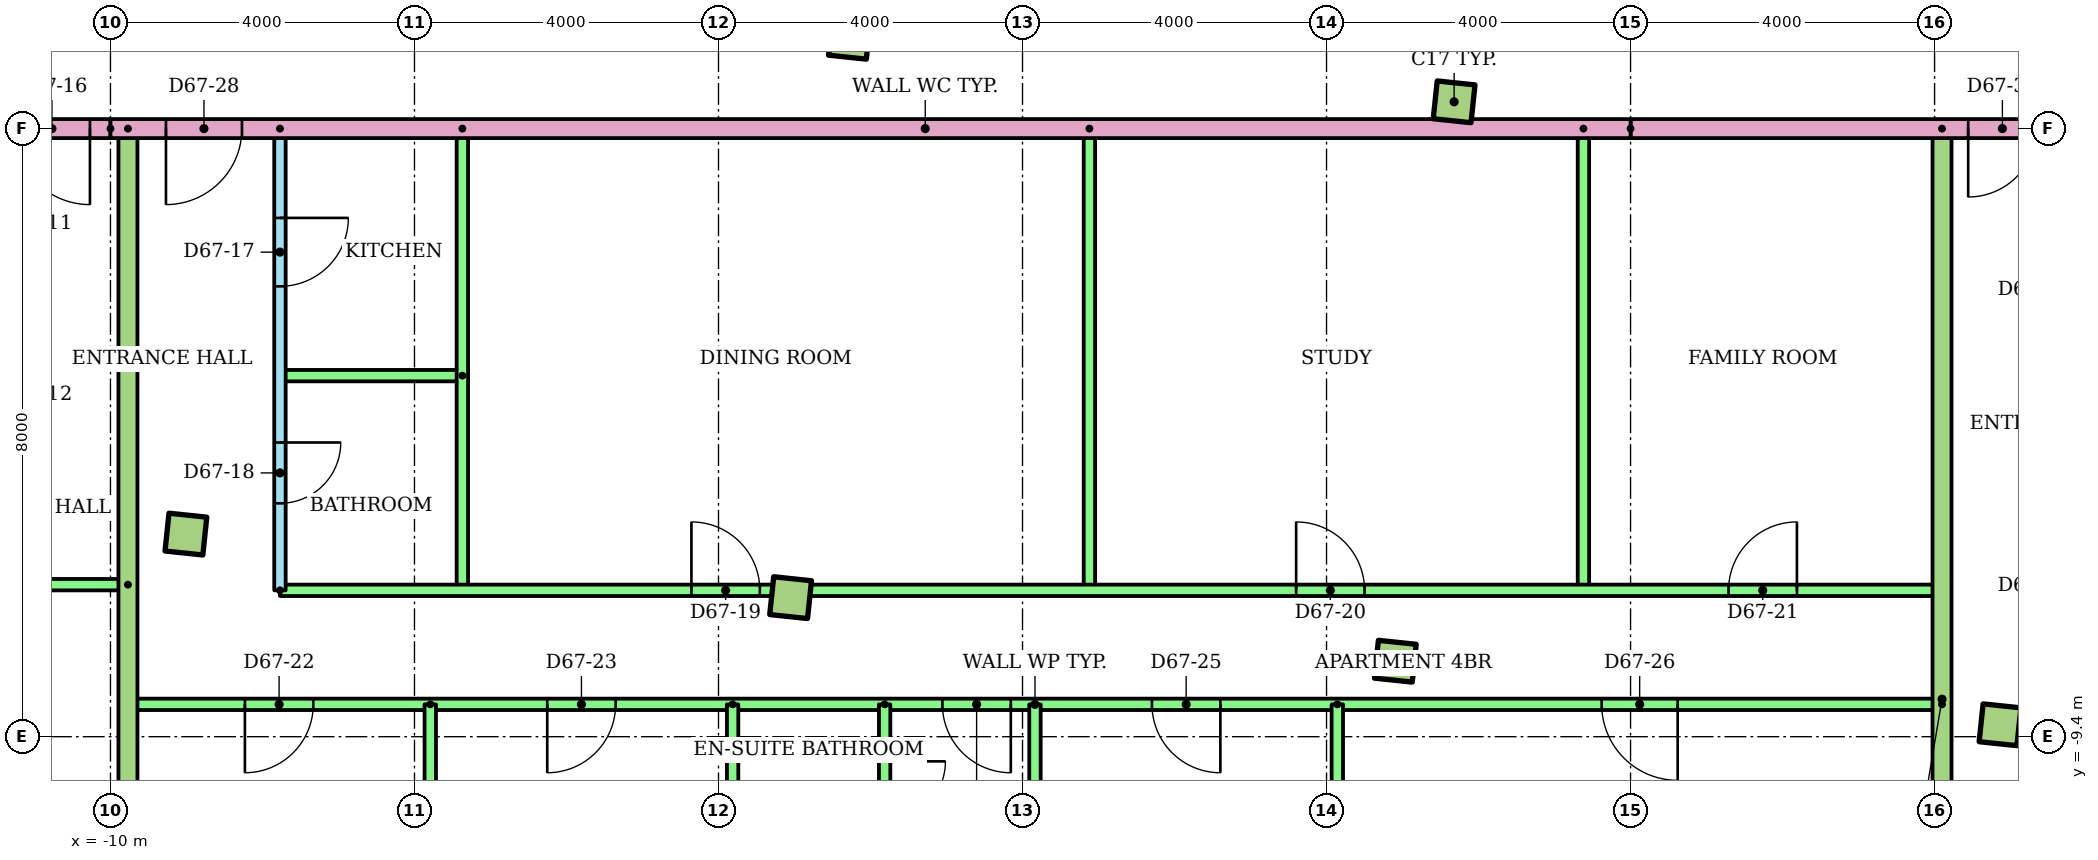
"""IFC4 building model, lengths in metres.
Left out: names, types, materials, properties, quantities, classifications, styles, units other than length and angle.
Written with IfcOpenShell. Run it as: python <this file> out.ifc"""

import sys

from ifc_helpers import new_model, si_unit, direction, frame, frame_2d, origin, origin_2d, place, context, subcontext, project, spatial, rectangle, extrude, element, fill, save


model = new_model("IFC4")
c1 = context("Model", 3, precision=1e-05, world=origin(), true_north=direction((0.0, 1.0)))
c2 = subcontext(c1, "Body", "Model", "MODEL_VIEW")
j1 = project(units=[si_unit("LENGTHUNIT", "METRE"), si_unit("PLANEANGLEUNIT", "RADIAN")], contexts=[c1])
p1 = place(None, origin())
s1 = spatial("IfcSite", under=j1, at=p1, CompositionType="ELEMENT")
p2 = place(p1, origin())
s2 = spatial("IfcBuilding", under=s1, at=p2, CompositionType="ELEMENT")
p3 = place(p2, frame((0.0, 0.0, 259.5)))
s3 = spatial("IfcBuildingStorey", under=s2, at=p3, CompositionType="ELEMENT", Elevation=259.5)
for number, where, z_axis, x_axis in (
    (1, (-9.007, -6.735, 0.0), (0.0, 0.0, 1.0), (0.995, -0.105, 0.0)),
    (2, (-1.051, -7.571, 0.0), (0.0, 0.0, 1.0), (0.995, -0.105, 0.0)),
    (3, (6.905, -8.407, 0.0), (0.0, 0.0, 1.0), (0.995, -0.105, 0.0)),
    (4, (14.861, -9.243, 0.0), (0.0, 0.0, 1.0), (0.995, -0.105, 0.0)),
    (5, (-0.278, -0.211, 0.0), (0.0, 0.0, 1.0), (0.995, -0.105, 0.0)),
    (6, (7.678, -1.048, 0.0), (0.0, 0.0, 1.0), (0.995, -0.105, 0.0)),
):
    element("IfcColumn", number, at=place(p3, frame(where, z_axis=z_axis, x_axis=x_axis)), inside=s3, PredefinedType="COLUMN", context=c2, shape_type="SweptSolid", body=[
        extrude(rectangle(XDim=0.5, YDim=0.5, at=origin_2d()), origin(), (0.0, 0.0, 1.0), 3.2),
    ])
p4 = place(p3, frame((-9.77, -7.4, 0.0), z_axis=(0.0, 0.0, 1.0), x_axis=(-1.0, 0.0, 0.0)))
e7 = element("IfcWall", 7, at=p4, inside=s3, PredefinedType="PARTITIONING", context=c2, shape_type="SweptSolid", body=[
    extrude(rectangle(XDim=14.411, YDim=0.15, at=frame_2d((7.206, 0.0))), origin(), (0.0, 0.0, 1.0), 2.4),
])
p5 = place(p4, frame((5.789, 0.0, 0.0)))
e8 = element("IfcOpeningElement", 8, at=p5, cuts=e7, PredefinedType="OPENING", context=c2, shape_type="SweptSolid", body=[
    extrude(rectangle(XDim=1.0, YDim=2.1, at=frame_2d((0.5, 1.05))), frame((0.0, 0.085, 0.0), z_axis=(0.0, -1.0, 0.0), x_axis=(1.0, 0.0, 0.0)), (0.0, 0.0, 1.0), 0.17),
])
p6 = place(p3, frame((-7.77, -1.4, 0.0), z_axis=(0.0, 0.0, 1.0), x_axis=(0.0, -1.0, 0.0)))
e9 = element("IfcWall", 9, at=p6, inside=s3, PredefinedType="PARTITIONING", context=c2, shape_type="SweptSolid", body=[
    extrude(rectangle(XDim=6.075, YDim=0.15, at=frame_2d((3.037, 0.0))), origin(), (0.0, 0.0, 1.0), 2.4),
])
p7 = place(p6, frame((1.175, 0.0, 0.0)))
e10 = element("IfcOpeningElement", 10, at=p7, cuts=e9, PredefinedType="OPENING", context=c2, shape_type="SweptSolid", body=[
    extrude(rectangle(XDim=0.9, YDim=2.1, at=frame_2d((0.45, 1.05))), frame((0.0, 0.085, 0.0), z_axis=(0.0, -1.0, 0.0), x_axis=(1.0, 0.0, 0.0)), (0.0, 0.0, 1.0), 0.17),
])
p8 = place(p6, frame((4.13, 0.0, 0.0)))
e11 = element("IfcOpeningElement", 11, at=p8, cuts=e9, PredefinedType="OPENING", context=c2, shape_type="SweptSolid", body=[
    extrude(rectangle(XDim=0.8, YDim=2.1, at=frame_2d((0.4, 1.05))), frame((0.0, 0.085, 0.0), z_axis=(0.0, -1.0, 0.0), x_axis=(1.0, 0.0, 0.0)), (0.0, 0.0, 1.0), 0.17),
])
p9 = place(p3, frame((-5.37, -4.65, 0.0), z_axis=(0.0, 0.0, 1.0), x_axis=(-1.0, 0.0, 0.0)))
e12 = element("IfcWall", 12, at=p9, inside=s3, PredefinedType="PARTITIONING", context=c2, shape_type="SweptSolid", body=[
    extrude(rectangle(XDim=2.4, YDim=0.15, at=frame_2d((1.2, 0.0))), origin(), (0.0, 0.0, 1.0), 2.4),
])
for number, where, z_axis, x_axis in (
    (13, (-5.37, -1.4, 0.0), (0.0, 0.0, 1.0), (0.0, -1.0, 0.0)),
    (14, (2.88, -1.4, 0.0), (0.0, 0.0, 1.0), (0.0, -1.0, 0.0)),
    (15, (9.38, -1.4, 0.0), (0.0, 0.0, 1.0), (0.0, -1.0, 0.0)),
):
    element("IfcWall", number, at=place(p3, frame(where, z_axis=z_axis, x_axis=x_axis)), inside=s3, PredefinedType="PARTITIONING", context=c2, shape_type="SweptSolid", body=[
        extrude(rectangle(XDim=6.075, YDim=0.15, at=frame_2d((3.037, 0.0))), origin(), (0.0, 0.0, 1.0), 2.4),
    ])
p10 = place(p3, frame((-7.77, -7.475, 0.0)))
e16 = element("IfcWall", 16, at=p10, inside=s3, PredefinedType="PARTITIONING", context=c2, shape_type="SweptSolid", body=[
    extrude(rectangle(XDim=21.868, YDim=0.15, at=frame_2d((10.934, 0.0))), origin(), (0.0, 0.0, 1.0), 2.4),
])
p11 = place(p10, frame((5.414, 0.0, 0.0)))
e17 = element("IfcOpeningElement", 17, at=p11, cuts=e16, PredefinedType="OPENING", context=c2, shape_type="SweptSolid", body=[
    extrude(rectangle(XDim=0.9, YDim=2.1, at=frame_2d((0.45, 1.05))), frame((0.0, 0.085, 0.0), z_axis=(0.0, -1.0, 0.0), x_axis=(1.0, 0.0, 0.0)), (0.0, 0.0, 1.0), 0.17),
])
p12 = place(p10, frame((13.37, 0.0, 0.0)))
e18 = element("IfcOpeningElement", 18, at=p12, cuts=e16, PredefinedType="OPENING", context=c2, shape_type="SweptSolid", body=[
    extrude(rectangle(XDim=0.9, YDim=2.1, at=frame_2d((0.45, 1.05))), frame((0.0, 0.085, 0.0), z_axis=(0.0, -1.0, 0.0), x_axis=(1.0, 0.0, 0.0)), (0.0, 0.0, 1.0), 0.17),
])
p13 = place(p10, frame((19.059, 0.0, 0.0)))
e19 = element("IfcOpeningElement", 19, at=p13, cuts=e16, PredefinedType="OPENING", context=c2, shape_type="SweptSolid", body=[
    extrude(rectangle(XDim=0.9, YDim=2.1, at=frame_2d((0.45, 1.05))), frame((0.0, 0.085, 0.0), z_axis=(0.0, -1.0, 0.0), x_axis=(1.0, 0.0, 0.0)), (0.0, 0.0, 1.0), 0.17),
])
p14 = place(p3, frame((14.098, -8.975, 0.0), z_axis=(0.0, 0.0, 1.0), x_axis=(-1.0, 0.0, 0.0)))
e20 = element("IfcWall", 20, at=p14, inside=s3, PredefinedType="PARTITIONING", context=c2, shape_type="SweptSolid", body=[
    extrude(rectangle(XDim=23.868, YDim=0.15, at=frame_2d((11.934, 0.0))), origin(), (0.0, 0.0, 1.0), 2.4),
])
p15 = place(p14, frame((21.429, 0.0, 0.0)))
e21 = element("IfcOpeningElement", 21, at=p15, cuts=e20, PredefinedType="OPENING", context=c2, shape_type="SweptSolid", body=[
    extrude(rectangle(XDim=0.9, YDim=2.1, at=frame_2d((0.45, 1.05))), frame((0.0, 0.085, 0.0), z_axis=(0.0, -1.0, 0.0), x_axis=(1.0, 0.0, 0.0)), (0.0, 0.0, 1.0), 0.17),
])
p16 = place(p14, frame((17.451, 0.0, 0.0)))
e22 = element("IfcOpeningElement", 22, at=p16, cuts=e20, PredefinedType="OPENING", context=c2, shape_type="SweptSolid", body=[
    extrude(rectangle(XDim=0.9, YDim=2.1, at=frame_2d((0.45, 1.05))), frame((0.0, 0.085, 0.0), z_axis=(0.0, -1.0, 0.0), x_axis=(1.0, 0.0, 0.0)), (0.0, 0.0, 1.0), 0.17),
])
p17 = place(p14, frame((12.252, 0.0, 0.0)))
e23 = element("IfcOpeningElement", 23, at=p17, cuts=e20, PredefinedType="OPENING", context=c2, shape_type="SweptSolid", body=[
    extrude(rectangle(XDim=0.9, YDim=2.1, at=frame_2d((0.45, 1.05))), frame((0.0, 0.085, 0.0), z_axis=(0.0, -1.0, 0.0), x_axis=(1.0, 0.0, 0.0)), (0.0, 0.0, 1.0), 0.17),
])
p18 = place(p14, frame((9.495, 0.0, 0.0)))
e24 = element("IfcOpeningElement", 24, at=p18, cuts=e20, PredefinedType="OPENING", context=c2, shape_type="SweptSolid", body=[
    extrude(rectangle(XDim=0.9, YDim=2.1, at=frame_2d((0.45, 1.05))), frame((0.0, 0.085, 0.0), z_axis=(0.0, -1.0, 0.0), x_axis=(1.0, 0.0, 0.0)), (0.0, 0.0, 1.0), 0.17),
])
p19 = place(p14, frame((3.478, 0.0, 0.0)))
e25 = element("IfcOpeningElement", 25, at=p19, cuts=e20, PredefinedType="OPENING", context=c2, shape_type="SweptSolid", body=[
    extrude(rectangle(XDim=1.0, YDim=2.1, at=frame_2d((0.5, 1.05))), frame((0.0, 0.085, 0.0), z_axis=(0.0, -1.0, 0.0), x_axis=(1.0, 0.0, 0.0)), (0.0, 0.0, 1.0), 0.17),
])
p20 = place(p3, frame((-5.792, -8.975, 0.0), z_axis=(0.0, 0.0, 1.0), x_axis=(0.0, -1.0, 0.0)))
e26 = element("IfcWall", 26, at=p20, inside=s3, PredefinedType="PARTITIONING", context=c2, shape_type="SweptSolid", body=[
    extrude(rectangle(XDim=5.359, YDim=0.15, at=frame_2d((2.679, 0.0))), origin(), (0.0, 0.0, 1.0), 2.4),
])
p21 = place(p3, frame((-1.814, -8.975, 0.0), z_axis=(0.0, 0.0, 1.0), x_axis=(0.0, -1.0, 0.0)))
e27 = element("IfcWall", 27, at=p21, inside=s3, PredefinedType="PARTITIONING", context=c2, shape_type="SweptSolid", body=[
    extrude(rectangle(XDim=5.766, YDim=0.15, at=frame_2d((2.883, 0.0))), origin(), (0.0, 0.0, 1.0), 2.4),
])
p22 = place(p3, frame((2.164, -8.975, 0.0), z_axis=(0.0, 0.0, 1.0), x_axis=(0.0, -1.0, 0.0)))
e28 = element("IfcWall", 28, at=p22, inside=s3, PredefinedType="PARTITIONING", context=c2, shape_type="SweptSolid", body=[
    extrude(rectangle(XDim=6.195, YDim=0.15, at=frame_2d((3.097, 0.0))), origin(), (0.0, 0.0, 1.0), 2.4),
])
p23 = place(p3, frame((6.142, -8.975, 0.0), z_axis=(0.0, 0.0, 1.0), x_axis=(0.0, -1.0, 0.0)))
e29 = element("IfcWall", 29, at=p23, inside=s3, PredefinedType="PARTITIONING", context=c2, shape_type="SweptSolid", body=[
    extrude(rectangle(XDim=6.602, YDim=0.15, at=frame_2d((3.301, 0.0))), origin(), (0.0, 0.0, 1.0), 2.4),
])
p24 = place(p3, frame((0.186, -8.975, 0.0), z_axis=(0.0, 0.0, 1.0), x_axis=(0.0, -1.0, 0.0)))
e30 = element("IfcWall", 30, at=p24, inside=s3, PredefinedType="PARTITIONING", context=c2, shape_type="SweptSolid", body=[
    extrude(rectangle(XDim=2.3, YDim=0.15, at=frame_2d((1.15, 0.0))), origin(), (0.0, 0.0, 1.0), 2.4),
])
p25 = place(p24, frame((0.75, 0.0, 0.0)))
e31 = element("IfcOpeningElement", 31, at=p25, cuts=e30, PredefinedType="OPENING", context=c2, shape_type="SweptSolid", body=[
    extrude(rectangle(XDim=0.8, YDim=2.1, at=frame_2d((0.4, 1.05))), frame((0.0, 0.085, 0.0), z_axis=(0.0, -1.0, 0.0), x_axis=(1.0, 0.0, 0.0)), (0.0, 0.0, 1.0), 0.17),
])
p26 = place(p3, frame((-9.77, -1.4, 0.0), z_axis=(0.0, 0.0, 1.0), x_axis=(0.0, -1.0, 0.0)))
e32 = element("IfcWall", 32, at=p26, inside=s3, PredefinedType="PARTITIONING", context=c2, shape_type="SweptSolid", body=[
    extrude(rectangle(XDim=12.504, YDim=0.25, at=frame_2d((6.252, 0.0))), origin(), (0.0, 0.0, 1.0), 2.4),
])
p27 = place(p3, frame((14.098, -1.4, 0.0), z_axis=(0.0, 0.0, 1.0), x_axis=(0.0, -1.0, 0.0)))
e33 = element("IfcWall", 33, at=p27, inside=s3, PredefinedType="PARTITIONING", context=c2, shape_type="SweptSolid", body=[
    extrude(rectangle(XDim=15.013, YDim=0.25, at=frame_2d((7.506, 0.0))), origin(), (0.0, 0.0, 1.0), 2.4),
])
p28 = place(p3, frame((-10.0, -1.4, 0.0), z_axis=(0.0, 0.0, 1.0), x_axis=(-1.0, 0.0, 0.0)))
e34 = element("IfcWall", 34, at=p28, inside=s3, PredefinedType="PARTITIONING", context=c2, shape_type="SweptSolid", body=[
    extrude(rectangle(XDim=13.56, YDim=0.25, at=frame_2d((6.78, 0.0))), origin(), (0.0, 0.0, 1.0), 2.4),
])
p29 = place(p28, frame((0.27, 0.0, 0.0)))
e35 = element("IfcOpeningElement", 35, at=p29, cuts=e34, PredefinedType="OPENING", context=c2, shape_type="SweptSolid", body=[
    extrude(rectangle(XDim=1.0, YDim=2.1, at=frame_2d((0.5, 1.05))), frame((0.0, 0.135, 0.0), z_axis=(0.0, -1.0, 0.0), x_axis=(1.0, 0.0, 0.0)), (0.0, 0.0, 1.0), 0.27),
])
p30 = place(p3, frame((25.0, -1.4, 0.0), z_axis=(0.0, 0.0, 1.0), x_axis=(-1.0, 0.0, 0.0)))
e36 = element("IfcWall", 36, at=p30, inside=s3, PredefinedType="PARTITIONING", context=c2, shape_type="SweptSolid", body=[
    extrude(rectangle(XDim=15.0, YDim=0.25, at=frame_2d((7.5, 0.0))), origin(), (0.0, 0.0, 1.0), 2.4),
])
p31 = place(p30, frame((9.658, 0.0, 0.0)))
e37 = element("IfcOpeningElement", 37, at=p31, cuts=e36, PredefinedType="OPENING", context=c2, shape_type="SweptSolid", body=[
    extrude(rectangle(XDim=0.9, YDim=2.1, at=frame_2d((0.45, 1.05))), frame((0.0, 0.135, 0.0), z_axis=(0.0, -1.0, 0.0), x_axis=(1.0, 0.0, 0.0)), (0.0, 0.0, 1.0), 0.27),
])
p32 = place(p3, frame((10.0, -1.4, 0.0), z_axis=(0.0, 0.0, 1.0), x_axis=(-1.0, 0.0, 0.0)))
e38 = element("IfcWall", 38, at=p32, inside=s3, PredefinedType="PARTITIONING", context=c2, shape_type="SweptSolid", body=[
    extrude(rectangle(XDim=20.0, YDim=0.25, at=frame_2d((10.0, 0.0))), origin(), (0.0, 0.0, 1.0), 2.4),
])
p33 = place(p32, frame((18.27, 0.0, 0.0)))
e39 = element("IfcOpeningElement", 39, at=p33, cuts=e38, PredefinedType="OPENING", context=c2, shape_type="SweptSolid", body=[
    extrude(rectangle(XDim=1.0, YDim=2.1, at=frame_2d((0.5, 1.05))), frame((0.0, 0.135, 0.0), z_axis=(0.0, -1.0, 0.0), x_axis=(1.0, 0.0, 0.0)), (0.0, 0.0, 1.0), 0.27),
])
p34 = place(p29, origin())
e40 = element("IfcDoor", 40, at=p34, inside=s3, OperationType="SINGLE_SWING_LEFT", PredefinedType="DOOR", context=c2, shape_type="SweptSolid", body=[
    extrude(rectangle(XDim=1.0, YDim=2.1, at=frame_2d((0.5, 1.05))), frame((0.0, 0.025, 0.0), z_axis=(0.0, -1.0, 0.0), x_axis=(1.0, 0.0, 0.0)), (0.0, 0.0, 1.0), 0.05),
])
fill(e35, e40)
p35 = place(p7, origin())
e41 = element("IfcDoor", 41, at=p35, inside=s3, OperationType="SINGLE_SWING_LEFT", PredefinedType="DOOR", context=c2, shape_type="SweptSolid", body=[
    extrude(rectangle(XDim=0.9, YDim=2.1, at=frame_2d((0.45, 1.05))), frame((0.0, 0.025, 0.0), z_axis=(0.0, -1.0, 0.0), x_axis=(1.0, 0.0, 0.0)), (0.0, 0.0, 1.0), 0.05),
])
fill(e10, e41)
p36 = place(p8, origin())
e42 = element("IfcDoor", 42, at=p36, inside=s3, OperationType="SINGLE_SWING_LEFT", PredefinedType="DOOR", context=c2, shape_type="SweptSolid", body=[
    extrude(rectangle(XDim=0.8, YDim=2.1, at=frame_2d((0.4, 1.05))), frame((0.0, 0.025, 0.0), z_axis=(0.0, -1.0, 0.0), x_axis=(1.0, 0.0, 0.0)), (0.0, 0.0, 1.0), 0.05),
])
fill(e11, e42)
p37 = place(p11, origin())
e43 = element("IfcDoor", 43, at=p37, inside=s3, OperationType="SINGLE_SWING_LEFT", PredefinedType="DOOR", context=c2, shape_type="SweptSolid", body=[
    extrude(rectangle(XDim=0.9, YDim=2.1, at=frame_2d((0.45, 1.05))), frame((0.0, 0.025, 0.0), z_axis=(0.0, -1.0, 0.0), x_axis=(1.0, 0.0, 0.0)), (0.0, 0.0, 1.0), 0.05),
])
fill(e17, e43)
p38 = place(p12, origin())
e44 = element("IfcDoor", 44, at=p38, inside=s3, OperationType="SINGLE_SWING_LEFT", PredefinedType="DOOR", context=c2, shape_type="SweptSolid", body=[
    extrude(rectangle(XDim=0.9, YDim=2.1, at=frame_2d((0.45, 1.05))), frame((0.0, 0.025, 0.0), z_axis=(0.0, -1.0, 0.0), x_axis=(1.0, 0.0, 0.0)), (0.0, 0.0, 1.0), 0.05),
])
fill(e18, e44)
p39 = place(p13, origin())
e45 = element("IfcDoor", 45, at=p39, inside=s3, OperationType="SINGLE_SWING_RIGHT", PredefinedType="DOOR", context=c2, shape_type="SweptSolid", body=[
    extrude(rectangle(XDim=0.9, YDim=2.1, at=frame_2d((0.45, 1.05))), frame((0.0, 0.025, 0.0), z_axis=(0.0, -1.0, 0.0), x_axis=(1.0, 0.0, 0.0)), (0.0, 0.0, 1.0), 0.05),
])
fill(e19, e45)
p40 = place(p15, origin())
e46 = element("IfcDoor", 46, at=p40, inside=s3, OperationType="SINGLE_SWING_RIGHT", PredefinedType="DOOR", context=c2, shape_type="SweptSolid", body=[
    extrude(rectangle(XDim=0.9, YDim=2.1, at=frame_2d((0.45, 1.05))), frame((0.0, 0.025, 0.0), z_axis=(0.0, -1.0, 0.0), x_axis=(1.0, 0.0, 0.0)), (0.0, 0.0, 1.0), 0.05),
])
fill(e21, e46)
p41 = place(p16, origin())
e47 = element("IfcDoor", 47, at=p41, inside=s3, OperationType="SINGLE_SWING_RIGHT", PredefinedType="DOOR", context=c2, shape_type="SweptSolid", body=[
    extrude(rectangle(XDim=0.9, YDim=2.1, at=frame_2d((0.45, 1.05))), frame((0.0, 0.025, 0.0), z_axis=(0.0, -1.0, 0.0), x_axis=(1.0, 0.0, 0.0)), (0.0, 0.0, 1.0), 0.05),
])
fill(e22, e47)
p42 = place(p17, origin())
e48 = element("IfcDoor", 48, at=p42, inside=s3, OperationType="SINGLE_SWING_LEFT", PredefinedType="DOOR", context=c2, shape_type="SweptSolid", body=[
    extrude(rectangle(XDim=0.9, YDim=2.1, at=frame_2d((0.45, 1.05))), frame((0.0, 0.025, 0.0), z_axis=(0.0, -1.0, 0.0), x_axis=(1.0, 0.0, 0.0)), (0.0, 0.0, 1.0), 0.05),
])
fill(e23, e48)
p43 = place(p18, origin())
e49 = element("IfcDoor", 49, at=p43, inside=s3, OperationType="SINGLE_SWING_LEFT", PredefinedType="DOOR", context=c2, shape_type="SweptSolid", body=[
    extrude(rectangle(XDim=0.9, YDim=2.1, at=frame_2d((0.45, 1.05))), frame((0.0, 0.025, 0.0), z_axis=(0.0, -1.0, 0.0), x_axis=(1.0, 0.0, 0.0)), (0.0, 0.0, 1.0), 0.05),
])
fill(e24, e49)
p44 = place(p19, origin())
e50 = element("IfcDoor", 50, at=p44, inside=s3, OperationType="SINGLE_SWING_LEFT", PredefinedType="DOOR", context=c2, shape_type="SweptSolid", body=[
    extrude(rectangle(XDim=1.0, YDim=2.1, at=frame_2d((0.5, 1.05))), frame((0.0, 0.025, 0.0), z_axis=(0.0, -1.0, 0.0), x_axis=(1.0, 0.0, 0.0)), (0.0, 0.0, 1.0), 0.05),
])
fill(e25, e50)
p45 = place(p25, origin())
e51 = element("IfcDoor", 51, at=p45, inside=s3, OperationType="SINGLE_SWING_LEFT", PredefinedType="DOOR", context=c2, shape_type="SweptSolid", body=[
    extrude(rectangle(XDim=0.8, YDim=2.1, at=frame_2d((0.4, 1.05))), frame((0.0, 0.025, 0.0), z_axis=(0.0, -1.0, 0.0), x_axis=(1.0, 0.0, 0.0)), (0.0, 0.0, 1.0), 0.05),
])
fill(e31, e51)
p46 = place(p33, origin())
e52 = element("IfcDoor", 52, at=p46, inside=s3, OperationType="SINGLE_SWING_RIGHT", PredefinedType="DOOR", context=c2, shape_type="SweptSolid", body=[
    extrude(rectangle(XDim=1.0, YDim=2.1, at=frame_2d((0.5, 1.05))), frame((0.0, 0.025, 0.0), z_axis=(0.0, -1.0, 0.0), x_axis=(1.0, 0.0, 0.0)), (0.0, 0.0, 1.0), 0.05),
])
fill(e39, e52)
p47 = place(p31, origin())
e53 = element("IfcDoor", 53, at=p47, inside=s3, OperationType="SINGLE_SWING_RIGHT", PredefinedType="DOOR", context=c2, shape_type="SweptSolid", body=[
    extrude(rectangle(XDim=0.9, YDim=2.1, at=frame_2d((0.45, 1.05))), frame((0.0, 0.025, 0.0), z_axis=(0.0, -1.0, 0.0), x_axis=(1.0, 0.0, 0.0)), (0.0, 0.0, 1.0), 0.05),
])
fill(e37, e53)
save(model, sys.argv[1])
